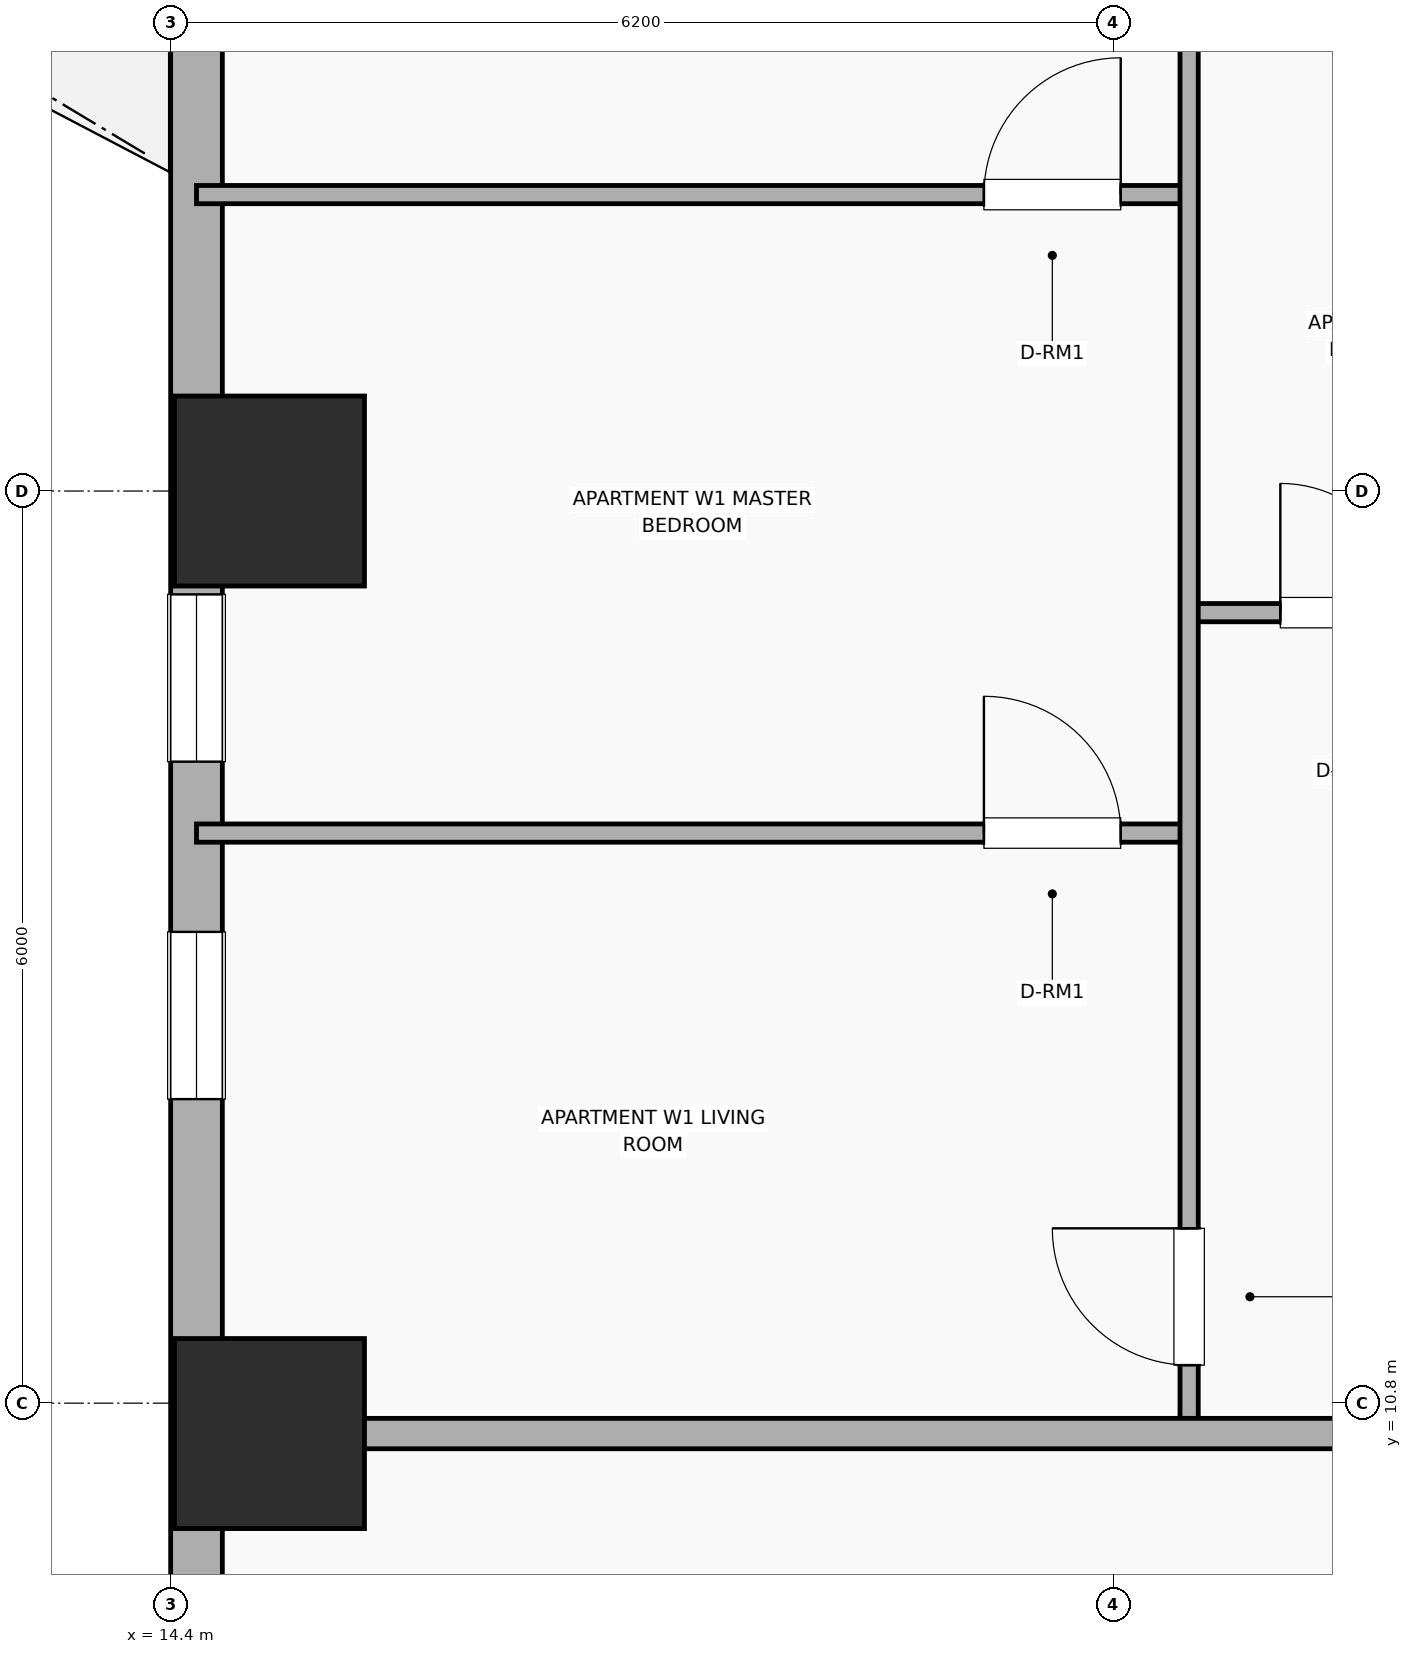
"""IFC4 building model, lengths in metres.
Left out: names, types, materials, properties, quantities, classifications, styles, units other than length and angle.
Written with IfcOpenShell. Run it as: python <this file> out.ifc"""

import sys

from ifc_helpers import new_model, si_unit, direction, frame, frame_2d, origin, origin_2d, place, context, subcontext, project, spatial, rectangle, extrude, element, fill, save


model = new_model("IFC4")
c1 = context("Model", 3, precision=1e-05, world=origin(), true_north=direction((0.0, 1.0)))
c2 = subcontext(c1, "Body", "Model", "MODEL_VIEW")
j1 = project(units=[si_unit("LENGTHUNIT", "METRE"), si_unit("PLANEANGLEUNIT", "RADIAN")], contexts=[c1])
p1 = place(None, origin())
s1 = spatial("IfcSite", under=j1, at=p1, CompositionType="ELEMENT")
p2 = place(p1, origin())
s2 = spatial("IfcBuilding", under=s1, at=p2, CompositionType="ELEMENT")
p3 = place(p2, frame((0.0, 0.0, 36.2)))
s3 = spatial("IfcBuildingStorey", under=s2, at=p3, CompositionType="ELEMENT", Elevation=36.2)
for number, where, z_axis, x_axis in (
    (1, (15.05, 10.6, 0.0), (0.0, 0.0, 1.0), (1.0, 0.0, 0.0)),
    (2, (15.05, 16.8, 0.0), (0.0, 0.0, 1.0), (1.0, 0.0, 0.0)),
):
    element("IfcColumn", number, at=place(p3, frame(where, z_axis=z_axis, x_axis=x_axis)), inside=s3, PredefinedType="COLUMN", context=c2, shape_type="SweptSolid", body=[
        extrude(rectangle(XDim=1.25, YDim=1.25, at=origin_2d()), origin(), (0.0, 0.0, 1.0), 3.7),
    ])
p4 = place(p3, frame((14.57, 23.8, 0.0), z_axis=(0.0, 0.0, 1.0), x_axis=(0.0, -1.0, 0.0)))
e3 = element("IfcWall", 3, at=p4, inside=s3, PredefinedType="SOLIDWALL", context=c2, shape_type="SweptSolid", body=[
    extrude(rectangle(XDim=14.8, YDim=0.34, at=frame_2d((7.4, 0.0))), origin(), (0.0, 0.0, 1.0), 2.7),
])
p5 = place(p4, frame((1.7, 0.0, 0.0)))
e4 = element("IfcOpeningElement", 4, at=p5, cuts=e3, PredefinedType="OPENING", context=c2, shape_type="SweptSolid", body=[
    extrude(rectangle(XDim=1.6, YDim=2.1, at=frame_2d((0.8, 1.05))), frame((0.0, 0.18, 0.0), z_axis=(0.0, -1.0, 0.0), x_axis=(1.0, 0.0, 0.0)), (0.0, 0.0, 1.0), 0.36),
])
p6 = place(p4, frame((7.68, 0.0, 0.89)))
e5 = element("IfcOpeningElement", 5, at=p6, cuts=e3, PredefinedType="OPENING", context=c2, shape_type="SweptSolid", body=[
    extrude(rectangle(XDim=1.1, YDim=1.65, at=frame_2d((0.55, 0.825))), frame((0.0, 0.18, 0.0), z_axis=(0.0, -1.0, 0.0), x_axis=(1.0, 0.0, 0.0)), (0.0, 0.0, 1.0), 0.36),
])
p7 = place(p4, frame((9.9, 0.0, 0.93)))
e6 = element("IfcOpeningElement", 6, at=p7, cuts=e3, PredefinedType="OPENING", context=c2, shape_type="SweptSolid", body=[
    extrude(rectangle(XDim=1.1, YDim=1.65, at=frame_2d((0.55, 0.825))), frame((0.0, 0.18, 0.0), z_axis=(0.0, -1.0, 0.0), x_axis=(1.0, 0.0, 0.0)), (0.0, 0.0, 1.0), 0.36),
])
p8 = place(p3, frame((21.1, 16.0, 0.0), z_axis=(0.0, 0.0, 1.0), x_axis=(1.0, 0.0, 0.0)))
e7 = element("IfcWall", 7, at=p8, inside=s3, PredefinedType="PARTITIONING", context=c2, shape_type="SweptSolid", body=[
    extrude(rectangle(XDim=2.25, YDim=0.12, at=frame_2d((1.125, 0.0))), origin(), (0.0, 0.0, 1.0), 2.53),
])
p9 = place(p8, frame((0.6, 0.0, 0.0)))
e8 = element("IfcOpeningElement", 8, at=p9, cuts=e7, PredefinedType="OPENING", context=c2, shape_type="SweptSolid", body=[
    extrude(rectangle(XDim=0.85, YDim=2.1, at=frame_2d((0.425, 1.05))), frame((0.0, 0.07, 0.0), z_axis=(0.0, -1.0, 0.0), x_axis=(1.0, 0.0, 0.0)), (0.0, 0.0, 1.0), 0.14),
])
p10 = place(p3, frame((14.57, 14.55, 0.0), z_axis=(0.0, 0.0, 1.0), x_axis=(1.0, 0.0, 0.0)))
e9 = element("IfcWall", 9, at=p10, inside=s3, PredefinedType="PARTITIONING", context=c2, shape_type="SweptSolid", body=[
    extrude(rectangle(XDim=6.53, YDim=0.12, at=frame_2d((3.265, 0.0))), origin(), (0.0, 0.0, 1.0), 2.53),
])
p11 = place(p10, frame((5.18, 0.0, 0.0)))
e10 = element("IfcOpeningElement", 10, at=p11, cuts=e9, PredefinedType="OPENING", context=c2, shape_type="SweptSolid", body=[
    extrude(rectangle(XDim=0.9, YDim=2.1, at=frame_2d((0.45, 1.05))), frame((0.0, 0.07, 0.0), z_axis=(0.0, -1.0, 0.0), x_axis=(1.0, 0.0, 0.0)), (0.0, 0.0, 1.0), 0.14),
])
p12 = place(p3, frame((14.57, 18.75, 0.0), z_axis=(0.0, 0.0, 1.0), x_axis=(1.0, 0.0, 0.0)))
e11 = element("IfcWall", 11, at=p12, inside=s3, PredefinedType="PARTITIONING", context=c2, shape_type="SweptSolid", body=[
    extrude(rectangle(XDim=6.53, YDim=0.12, at=frame_2d((3.265, 0.0))), origin(), (0.0, 0.0, 1.0), 2.53),
])
p13 = place(p12, frame((5.18, 0.0, 0.0)))
e12 = element("IfcOpeningElement", 12, at=p13, cuts=e11, PredefinedType="OPENING", context=c2, shape_type="SweptSolid", body=[
    extrude(rectangle(XDim=0.9, YDim=2.1, at=frame_2d((0.45, 1.05))), frame((0.0, 0.07, 0.0), z_axis=(0.0, -1.0, 0.0), x_axis=(1.0, 0.0, 0.0)), (0.0, 0.0, 1.0), 0.14),
])
p14 = place(p3, frame((21.1, 10.64, 0.0), z_axis=(0.0, 0.0, 1.0), x_axis=(0.0, 1.0, 0.0)))
e13 = element("IfcWall", 13, at=p14, inside=s3, PredefinedType="PARTITIONING", context=c2, shape_type="SweptSolid", body=[
    extrude(rectangle(XDim=12.02, YDim=0.12, at=frame_2d((6.01, 0.0))), origin(), (0.0, 0.0, 1.0), 2.53),
])
p15 = place(p14, frame((0.41, 0.0, 0.0)))
e14 = element("IfcOpeningElement", 14, at=p15, cuts=e13, PredefinedType="OPENING", context=c2, shape_type="SweptSolid", body=[
    extrude(rectangle(XDim=0.9, YDim=2.1, at=frame_2d((0.45, 1.05))), frame((0.0, 0.07, 0.0), z_axis=(0.0, -1.0, 0.0), x_axis=(1.0, 0.0, 0.0)), (0.0, 0.0, 1.0), 0.14),
])
p16 = place(p14, frame((10.185, 0.0, 0.0)))
e15 = element("IfcOpeningElement", 15, at=p16, cuts=e13, PredefinedType="OPENING", context=c2, shape_type="SweptSolid", body=[
    extrude(rectangle(XDim=0.82, YDim=2.08, at=frame_2d((0.41, 1.04))), frame((0.0, 0.07, 0.0), z_axis=(0.0, -1.0, 0.0), x_axis=(1.0, 0.0, 0.0)), (0.0, 0.0, 1.0), 0.14),
])
p17 = place(p3, frame((14.99, 10.6, 0.0), z_axis=(0.0, 0.0, 1.0), x_axis=(1.0, 0.0, 0.0)))
e16 = element("IfcWall", 16, at=p17, inside=s3, PredefinedType="PARTITIONING", context=c2, shape_type="SweptSolid", body=[
    extrude(rectangle(XDim=8.36, YDim=0.2, at=frame_2d((4.18, 0.0))), origin(), (0.0, 0.0, 1.0), 2.53),
])
p18 = place(p6, origin())
e17 = element("IfcWindow", 17, at=p18, inside=s3, PartitioningType="SINGLE_PANEL", PredefinedType="WINDOW", context=c2, shape_type="SweptSolid", body=[
    extrude(rectangle(XDim=1.1, YDim=1.65, at=frame_2d((0.55, 0.825))), frame((0.0, 0.03, 0.0), z_axis=(0.0, -1.0, 0.0), x_axis=(1.0, 0.0, 0.0)), (0.0, 0.0, 1.0), 0.06),
])
fill(e5, e17)
p19 = place(p7, origin())
e18 = element("IfcWindow", 18, at=p19, inside=s3, PartitioningType="SINGLE_PANEL", PredefinedType="WINDOW", context=c2, shape_type="SweptSolid", body=[
    extrude(rectangle(XDim=1.1, YDim=1.65, at=frame_2d((0.55, 0.825))), frame((0.0, 0.03, 0.0), z_axis=(0.0, -1.0, 0.0), x_axis=(1.0, 0.0, 0.0)), (0.0, 0.0, 1.0), 0.06),
])
fill(e6, e18)
p20 = place(p9, origin())
e19 = element("IfcDoor", 19, at=p20, inside=s3, OperationType="SINGLE_SWING_LEFT", PredefinedType="DOOR", context=c2, shape_type="SweptSolid", body=[
    extrude(rectangle(XDim=0.85, YDim=2.1, at=frame_2d((0.425, 1.05))), frame((0.0, 0.025, 0.0), z_axis=(0.0, -1.0, 0.0), x_axis=(1.0, 0.0, 0.0)), (0.0, 0.0, 1.0), 0.05),
])
fill(e8, e19)
p21 = place(p11, origin())
e20 = element("IfcDoor", 20, at=p21, inside=s3, OperationType="SINGLE_SWING_LEFT", PredefinedType="DOOR", context=c2, shape_type="SweptSolid", body=[
    extrude(rectangle(XDim=0.9, YDim=2.1, at=frame_2d((0.45, 1.05))), frame((0.0, 0.025, 0.0), z_axis=(0.0, -1.0, 0.0), x_axis=(1.0, 0.0, 0.0)), (0.0, 0.0, 1.0), 0.05),
])
fill(e10, e20)
p22 = place(p13, origin())
e21 = element("IfcDoor", 21, at=p22, inside=s3, OperationType="SINGLE_SWING_RIGHT", PredefinedType="DOOR", context=c2, shape_type="SweptSolid", body=[
    extrude(rectangle(XDim=0.9, YDim=2.1, at=frame_2d((0.45, 1.05))), frame((0.0, 0.025, 0.0), z_axis=(0.0, -1.0, 0.0), x_axis=(1.0, 0.0, 0.0)), (0.0, 0.0, 1.0), 0.05),
])
fill(e12, e21)
p23 = place(p15, origin())
e22 = element("IfcDoor", 22, at=p23, inside=s3, OperationType="SINGLE_SWING_RIGHT", PredefinedType="DOOR", context=c2, shape_type="SweptSolid", body=[
    extrude(rectangle(XDim=0.9, YDim=2.1, at=frame_2d((0.45, 1.05))), frame((0.0, 0.025, 0.0), z_axis=(0.0, -1.0, 0.0), x_axis=(1.0, 0.0, 0.0)), (0.0, 0.0, 1.0), 0.05),
])
fill(e14, e22)
save(model, sys.argv[1])
